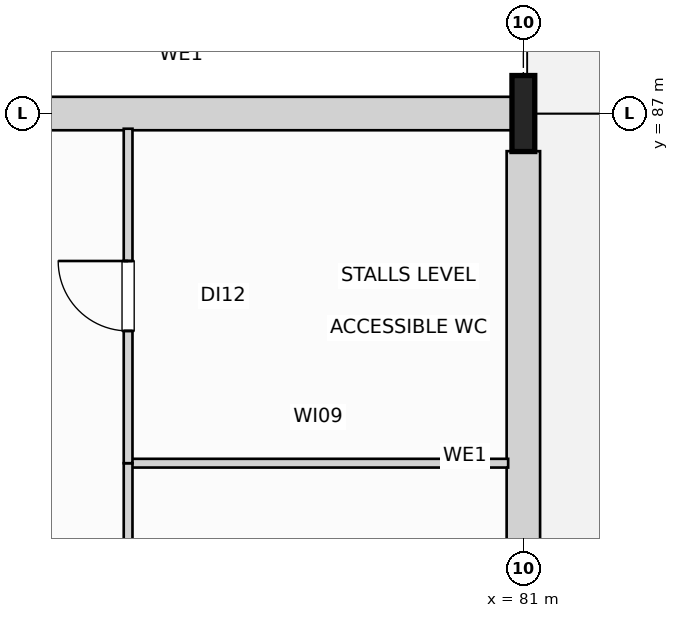
"""IFC4 building model, lengths in metres.
Left out: names, types, materials, properties, quantities, classifications, styles, units other than length and angle.
Written with IfcOpenShell. Run it as: python <this file> out.ifc"""

import sys

from ifc_helpers import new_model, si_unit, direction, frame, frame_2d, origin, origin_2d, place, context, subcontext, project, spatial, rectangle, i_section, extrude, element, fill, save


model = new_model("IFC4")
c1 = context("Model", 3, precision=1e-05, world=origin(), true_north=direction((0.0, 1.0)))
c2 = subcontext(c1, "Body", "Model", "MODEL_VIEW")
j1 = project(units=[si_unit("LENGTHUNIT", "METRE"), si_unit("PLANEANGLEUNIT", "RADIAN")], contexts=[c1])
p1 = place(None, origin())
s1 = spatial("IfcSite", under=j1, at=p1, CompositionType="ELEMENT")
p2 = place(p1, origin())
s2 = spatial("IfcBuilding", under=s1, at=p2, CompositionType="ELEMENT")
p3 = place(p2, frame((0.0, 0.0, 11.4)))
s3 = spatial("IfcBuildingStorey", under=s2, at=p3, CompositionType="ELEMENT", Elevation=11.4)
p4 = place(p3, frame((81.0, 87.0, 0.0), z_axis=(0.0, 0.0, 1.0), x_axis=(1.0, 0.0, 0.0)))
e1 = element("IfcColumn", 1, at=p4, inside=s3, PredefinedType="COLUMN", context=c2, shape_type="SweptSolid", body=[
    extrude(i_section(OverallWidth=0.3, OverallDepth=1.0, WebThickness=0.019, FlangeThickness=0.036, at=origin_2d()), origin(), (0.0, 0.0, 1.0), 5.4),
])
p5 = place(p3, frame((72.145, 87.0, 0.0), z_axis=(0.0, 0.0, 1.0), x_axis=(1.0, 0.0, 0.0)))
e2 = element("IfcWall", 2, at=p5, inside=s3, PredefinedType="SOLIDWALL", context=c2, shape_type="SweptSolid", body=[
    extrude(rectangle(XDim=8.71, YDim=0.44, at=frame_2d((4.355, 0.0))), origin(), (0.0, 0.0, 1.0), 4.485),
])
p6 = place(p3, frame((81.0, 78.495, 0.0), z_axis=(0.0, 0.0, 1.0), x_axis=(0.0, 1.0, 0.0)))
e3 = element("IfcWall", 3, at=p6, inside=s3, PredefinedType="SOLIDWALL", context=c2, shape_type="SweptSolid", body=[
    extrude(rectangle(XDim=8.01, YDim=0.44, at=frame_2d((4.005, 0.0))), origin(), (0.0, 0.0, 1.0), 4.535),
])
p7 = place(p3, frame((75.8, 82.4, 0.0), z_axis=(0.0, 0.0, 1.0), x_axis=(1.0, 0.0, 0.0)))
e4 = element("IfcWall", 4, at=p7, inside=s3, PredefinedType="PARTITIONING", context=c2, shape_type="SweptSolid", body=[
    extrude(rectangle(XDim=5.0, YDim=0.115, at=frame_2d((2.5, 0.0))), origin(), (0.0, 0.0, 1.0), 4.695),
])
p8 = place(p3, frame((75.8, 78.0, 0.0), z_axis=(0.0, 0.0, 1.0), x_axis=(0.0, 1.0, 0.0)))
e5 = element("IfcWall", 5, at=p8, inside=s3, PredefinedType="PARTITIONING", context=c2, shape_type="SweptSolid", body=[
    extrude(rectangle(XDim=4.4, YDim=0.115, at=frame_2d((2.2, 0.0))), origin(), (0.0, 0.0, 1.0), 4.595),
])
p9 = place(p8, frame((1.76, 0.0, 0.0)))
e6 = element("IfcOpeningElement", 6, at=p9, cuts=e5, PredefinedType="OPENING", context=c2, shape_type="SweptSolid", body=[
    extrude(rectangle(XDim=0.88, YDim=2.06, at=frame_2d((0.44, 1.03))), frame((0.0, 0.067, 0.0), z_axis=(0.0, -1.0, 0.0), x_axis=(1.0, 0.0, 0.0)), (0.0, 0.0, 1.0), 0.135),
])
p10 = place(p3, frame((75.8, 82.4, 0.0), z_axis=(0.0, 0.0, 1.0), x_axis=(0.0, 1.0, 0.0)))
e7 = element("IfcWall", 7, at=p10, inside=s3, PredefinedType="PARTITIONING", context=c2, shape_type="SweptSolid", body=[
    extrude(rectangle(XDim=4.4, YDim=0.115, at=frame_2d((2.2, 0.0))), origin(), (0.0, 0.0, 1.0), 4.535),
])
p11 = place(p10, frame((1.74, 0.0, 0.0)))
e8 = element("IfcOpeningElement", 8, at=p11, cuts=e7, PredefinedType="OPENING", context=c2, shape_type="SweptSolid", body=[
    extrude(rectangle(XDim=0.92, YDim=2.08, at=frame_2d((0.46, 1.04))), frame((0.0, 0.067, 0.0), z_axis=(0.0, -1.0, 0.0), x_axis=(1.0, 0.0, 0.0)), (0.0, 0.0, 1.0), 0.135),
])
p12 = place(p11, origin())
e9 = element("IfcDoor", 9, at=p12, inside=s3, OperationType="SINGLE_SWING_RIGHT", PredefinedType="DOOR", context=c2, shape_type="SweptSolid", body=[
    extrude(rectangle(XDim=0.92, YDim=2.08, at=frame_2d((0.46, 1.04))), frame((0.0, 0.025, 0.0), z_axis=(0.0, -1.0, 0.0), x_axis=(1.0, 0.0, 0.0)), (0.0, 0.0, 1.0), 0.05),
])
fill(e8, e9)
save(model, sys.argv[1])
